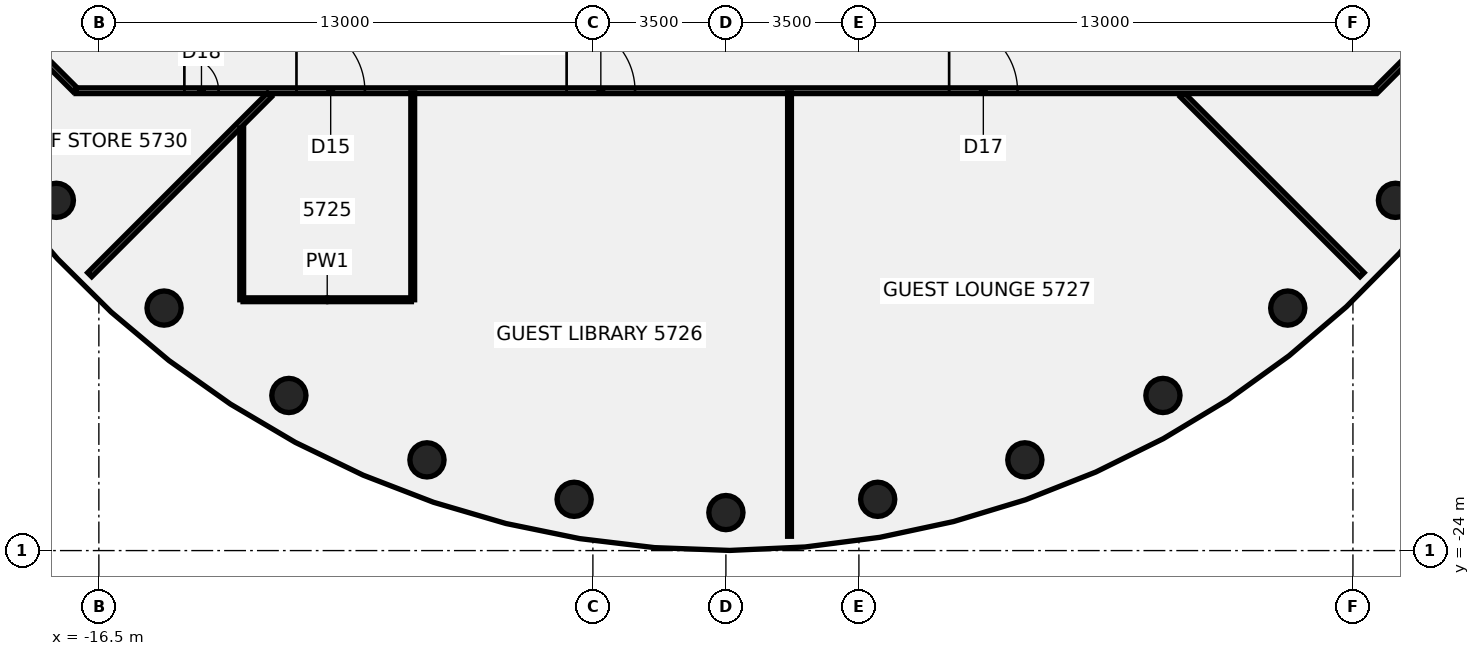
"""IFC4 building model, lengths in metres.
Left out: names, types, materials, properties, quantities, classifications, styles, units other than length and angle.
Written with IfcOpenShell. Run it as: python <this file> out.ifc"""

import sys

from ifc_helpers import new_model, si_unit, direction, frame, frame_2d, origin, origin_2d, place, context, subcontext, project, spatial, rectangle, circle, extrude, element, fill, save


model = new_model("IFC4")
c1 = context("Model", 3, precision=1e-05, world=origin(), true_north=direction((0.0, 1.0)))
c2 = subcontext(c1, "Body", "Model", "MODEL_VIEW")
j1 = project(units=[si_unit("LENGTHUNIT", "METRE"), si_unit("PLANEANGLEUNIT", "RADIAN")], contexts=[c1])
p1 = place(None, origin())
s1 = spatial("IfcSite", under=j1, at=p1, CompositionType="ELEMENT")
p2 = place(p1, origin())
s2 = spatial("IfcBuilding", under=s1, at=p2, CompositionType="ELEMENT")
p3 = place(p2, frame((0.0, 0.0, 227.1)))
s3 = spatial("IfcBuildingStorey", under=s2, at=p3, CompositionType="ELEMENT", Elevation=227.1)
for number, where, z_axis, x_axis in (
    (1, (-17.619, -14.784, -0.14), (0.0, 0.0, 1.0), (1.0, 0.0, 0.0)),
    (2, (-14.784, -17.619, -0.14), (0.0, 0.0, 1.0), (1.0, 0.0, 0.0)),
    (3, (-11.5, -19.919, -0.14), (0.0, 0.0, 1.0), (1.0, 0.0, 0.0)),
    (4, (-7.866, -21.613, -0.14), (0.0, 0.0, 1.0), (1.0, 0.0, 0.0)),
    (5, (-3.994, -22.651, -0.14), (0.0, 0.0, 1.0), (1.0, 0.0, 0.0)),
    (6, (0.0, -23.0, -0.14), (0.0, 0.0, 1.0), (1.0, 0.0, 0.0)),
    (7, (3.994, -22.651, -0.14), (0.0, 0.0, 1.0), (1.0, 0.0, 0.0)),
    (8, (7.866, -21.613, -0.14), (0.0, 0.0, 1.0), (1.0, 0.0, 0.0)),
    (9, (11.5, -19.919, -0.14), (0.0, 0.0, 1.0), (1.0, 0.0, 0.0)),
    (10, (14.784, -17.619, -0.14), (0.0, 0.0, 1.0), (1.0, 0.0, 0.0)),
    (11, (17.619, -14.784, -0.14), (0.0, 0.0, 1.0), (1.0, 0.0, 0.0)),
):
    element("IfcColumn", number, at=place(p3, frame(where, z_axis=z_axis, x_axis=x_axis)), inside=s3, PredefinedType="COLUMN", context=c2, shape_type="SweptSolid", body=[
        extrude(circle(Radius=0.45, at=origin_2d()), origin(), (0.0, 0.0, 1.0), 3.6),
    ])
p4 = place(p3, frame((-18.872, -10.128, 0.0), z_axis=(0.0, 0.0, 1.0), x_axis=(0.707106781187, -0.707106781187, 0.0)))
e12 = element("IfcWall", 12, at=p4, inside=s3, PredefinedType="PARTITIONING", context=c2, shape_type="SweptSolid", body=[
    extrude(rectangle(XDim=2.465, YDim=0.15, at=frame_2d((1.232, 0.0))), origin(), (0.0, 0.0, 1.0), 2.864),
])
p5 = place(p3, frame((12.01, -12.01, 0.0), z_axis=(0.0, 0.0, 1.0), x_axis=(0.707106781187, -0.707106781187, 0.0)))
e13 = element("IfcWall", 13, at=p5, inside=s3, PredefinedType="PARTITIONING", context=c2, shape_type="SweptSolid", body=[
    extrude(rectangle(XDim=6.691, YDim=0.15, at=frame_2d((3.345, 0.0))), origin(), (0.0, 0.0, 1.0), 2.864),
])
p6 = place(p3, frame((-17.1, -11.9, 0.0), z_axis=(0.0, 0.0, 1.0), x_axis=(1.0, 0.0, 0.0)))
e14 = element("IfcWall", 14, at=p6, inside=s3, PredefinedType="PARTITIONING", context=c2, shape_type="SweptSolid", body=[
    extrude(rectangle(XDim=34.165, YDim=0.15, at=frame_2d((17.083, 0.0))), origin(), (0.0, 0.0, 1.0), 2.864),
])
p7 = place(p6, frame((5.8, 0.0, 0.0)))
e15 = element("IfcOpeningElement", 15, at=p7, cuts=e14, PredefinedType="OPENING", context=c2, shape_type="SweptSolid", body=[
    extrude(rectangle(XDim=1.8, YDim=2.1, at=frame_2d((0.9, 1.05))), frame((0.0, 0.085, 0.0), z_axis=(0.0, -1.0, 0.0), x_axis=(1.0, 0.0, 0.0)), (0.0, 0.0, 1.0), 0.17),
])
p8 = place(p6, frame((12.909, 0.0, 0.0)))
e16 = element("IfcOpeningElement", 16, at=p8, cuts=e14, PredefinedType="OPENING", context=c2, shape_type="SweptSolid", body=[
    extrude(rectangle(XDim=1.8, YDim=2.1, at=frame_2d((0.9, 1.05))), frame((0.0, 0.085, 0.0), z_axis=(0.0, -1.0, 0.0), x_axis=(1.0, 0.0, 0.0)), (0.0, 0.0, 1.0), 0.17),
])
p9 = place(p6, frame((22.974, 0.0, 0.0)))
e17 = element("IfcOpeningElement", 17, at=p9, cuts=e14, PredefinedType="OPENING", context=c2, shape_type="SweptSolid", body=[
    extrude(rectangle(XDim=1.8, YDim=2.1, at=frame_2d((0.9, 1.05))), frame((0.0, 0.085, 0.0), z_axis=(0.0, -1.0, 0.0), x_axis=(1.0, 0.0, 0.0)), (0.0, 0.0, 1.0), 0.17),
])
p10 = place(p6, frame((2.85, 0.0, 0.0)))
e18 = element("IfcOpeningElement", 18, at=p10, cuts=e14, PredefinedType="OPENING", context=c2, shape_type="SweptSolid", body=[
    extrude(rectangle(XDim=0.9, YDim=2.1, at=frame_2d((0.45, 1.05))), frame((0.0, 0.085, 0.0), z_axis=(0.0, -1.0, 0.0), x_axis=(1.0, 0.0, 0.0)), (0.0, 0.0, 1.0), 0.17),
])
p11 = place(p3, frame((-12.706, -17.4, 0.0), z_axis=(0.0, 0.0, 1.0), x_axis=(1.0, 0.0, 0.0)))
e19 = element("IfcWall", 19, at=p11, inside=s3, PredefinedType="PARTITIONING", context=c2, shape_type="SweptSolid", body=[
    extrude(rectangle(XDim=4.43, YDim=0.1, at=frame_2d((2.215, 0.0))), origin(), (0.0, 0.0, 1.0), 2.864),
])
p12 = place(p3, frame((-16.74, -16.74, 0.0), z_axis=(0.0, 0.0, 1.0), x_axis=(0.707106781187, 0.707106781187, 0.0)))
e20 = element("IfcWall", 20, at=p12, inside=s3, PredefinedType="PARTITIONING", context=c2, shape_type="SweptSolid", body=[
    extrude(rectangle(XDim=6.691, YDim=0.15, at=frame_2d((3.345, 0.0))), origin(), (0.0, 0.0, 1.0), 2.864),
])
p13 = place(p3, frame((17.1, -11.9, 0.0), z_axis=(0.0, 0.0, 1.0), x_axis=(0.707106781187, 0.707106781187, 0.0)))
e21 = element("IfcWall", 21, at=p13, inside=s3, PredefinedType="PARTITIONING", context=c2, shape_type="SweptSolid", body=[
    extrude(rectangle(XDim=2.505, YDim=0.15, at=frame_2d((1.253, 0.0))), origin(), (0.0, 0.0, 1.0), 2.864),
])
p14 = place(p3, frame((-12.741, -17.4, 0.0), z_axis=(0.0, 0.0, 1.0), x_axis=(0.0, 1.0, 0.0)))
e22 = element("IfcWall", 22, at=p14, inside=s3, PredefinedType="PARTITIONING", context=c2, shape_type="SweptSolid", body=[
    extrude(rectangle(XDim=4.519, YDim=0.1, at=frame_2d((2.259, 0.0))), origin(), (0.0, 0.0, 1.0), 2.864),
])
p15 = place(p3, frame((-8.241, -17.4, 0.0), z_axis=(0.0, 0.0, 1.0), x_axis=(0.0, 1.0, 0.0)))
e23 = element("IfcWall", 23, at=p15, inside=s3, PredefinedType="PARTITIONING", context=c2, shape_type="SweptSolid", body=[
    extrude(rectangle(XDim=5.445, YDim=0.1, at=frame_2d((2.722, 0.0))), origin(), (0.0, 0.0, 1.0), 2.864),
])
p16 = place(p3, frame((1.674, -23.623, 0.0), z_axis=(0.0, 0.0, 1.0), x_axis=(0.0, 1.0, 0.0)))
e24 = element("IfcWall", 24, at=p16, inside=s3, PredefinedType="PARTITIONING", context=c2, shape_type="SweptSolid", body=[
    extrude(rectangle(XDim=11.668, YDim=0.1, at=frame_2d((5.834, 0.0))), origin(), (0.0, 0.0, 1.0), 2.864),
])
p17 = place(p7, frame((1.8, 0.0, 0.0), z_axis=(0.0, 0.0, 1.0), x_axis=(-1.0, 0.0, 0.0)))
e25 = element("IfcDoor", 25, at=p17, inside=s3, OperationType="DOUBLE_DOOR_SINGLE_SWING", PredefinedType="DOOR", context=c2, shape_type="SweptSolid", body=[
    extrude(rectangle(XDim=1.8, YDim=2.1, at=frame_2d((0.9, 1.05))), frame((0.0, 0.025, 0.0), z_axis=(0.0, -1.0, 0.0), x_axis=(1.0, 0.0, 0.0)), (0.0, 0.0, 1.0), 0.05),
])
fill(e15, e25)
p18 = place(p8, frame((1.8, 0.0, 0.0), z_axis=(0.0, 0.0, 1.0), x_axis=(-1.0, 0.0, 0.0)))
e26 = element("IfcDoor", 26, at=p18, inside=s3, OperationType="DOUBLE_DOOR_SINGLE_SWING", PredefinedType="DOOR", context=c2, shape_type="SweptSolid", body=[
    extrude(rectangle(XDim=1.8, YDim=2.1, at=frame_2d((0.9, 1.05))), frame((0.0, 0.025, 0.0), z_axis=(0.0, -1.0, 0.0), x_axis=(1.0, 0.0, 0.0)), (0.0, 0.0, 1.0), 0.05),
])
fill(e16, e26)
p19 = place(p9, frame((1.8, 0.0, 0.0), z_axis=(0.0, 0.0, 1.0), x_axis=(-1.0, 0.0, 0.0)))
e27 = element("IfcDoor", 27, at=p19, inside=s3, OperationType="DOUBLE_DOOR_SINGLE_SWING", PredefinedType="DOOR", context=c2, shape_type="SweptSolid", body=[
    extrude(rectangle(XDim=1.8, YDim=2.1, at=frame_2d((0.9, 1.05))), frame((0.0, 0.025, 0.0), z_axis=(0.0, -1.0, 0.0), x_axis=(1.0, 0.0, 0.0)), (0.0, 0.0, 1.0), 0.05),
])
fill(e17, e27)
p20 = place(p10, frame((0.9, 0.0, 0.0), z_axis=(0.0, 0.0, 1.0), x_axis=(-1.0, 0.0, 0.0)))
e28 = element("IfcDoor", 28, at=p20, inside=s3, OperationType="SINGLE_SWING_LEFT", PredefinedType="DOOR", context=c2, shape_type="SweptSolid", body=[
    extrude(rectangle(XDim=0.9, YDim=2.1, at=frame_2d((0.45, 1.05))), frame((0.0, 0.025, 0.0), z_axis=(0.0, -1.0, 0.0), x_axis=(1.0, 0.0, 0.0)), (0.0, 0.0, 1.0), 0.05),
])
fill(e18, e28)
save(model, sys.argv[1])
